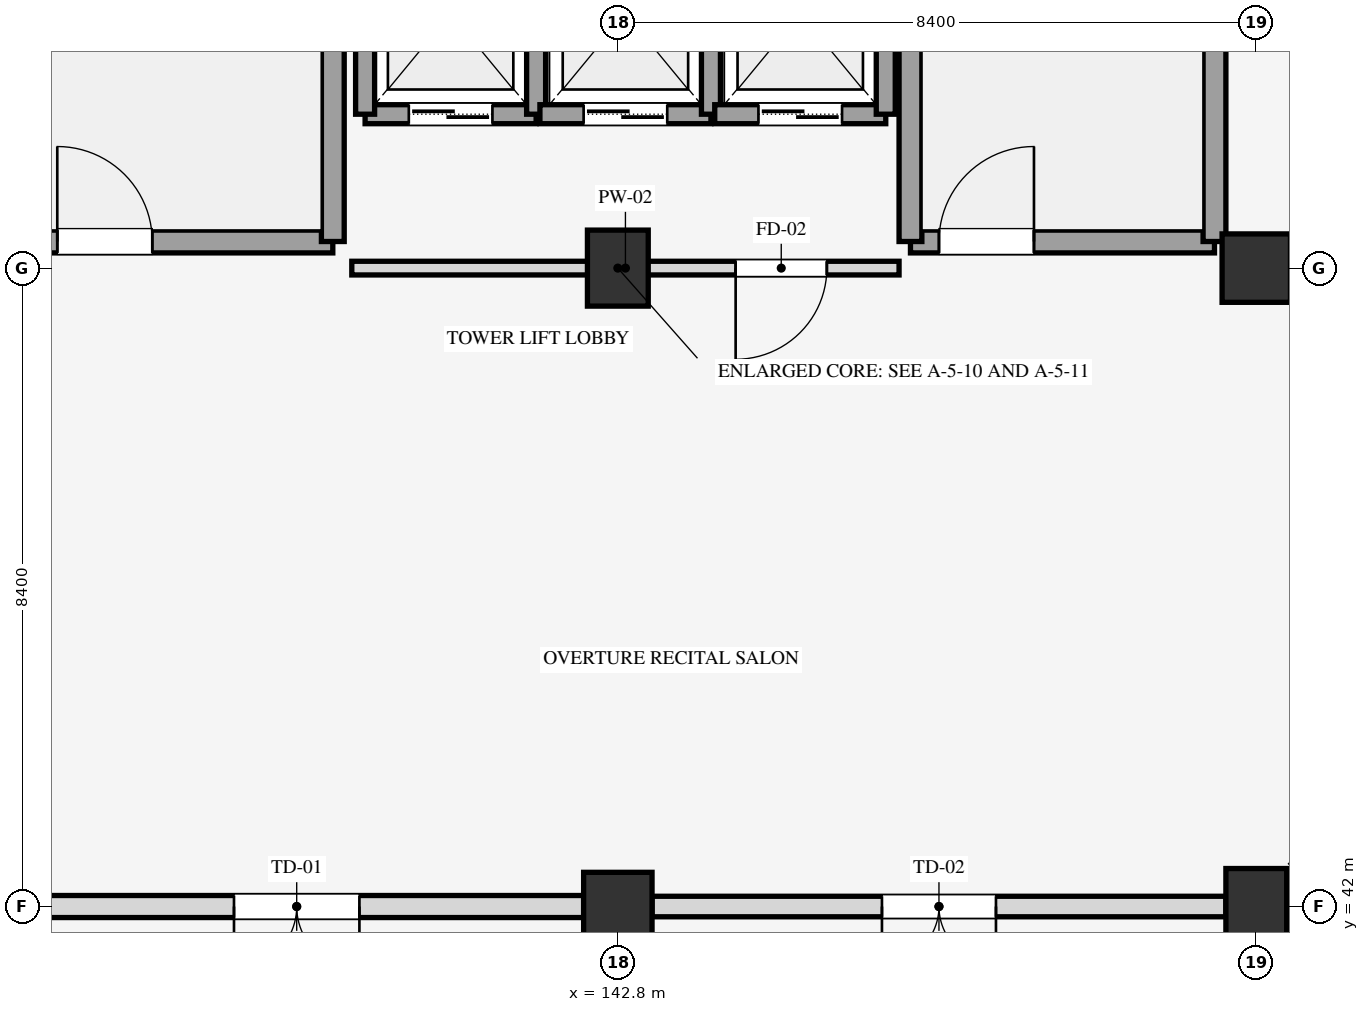
"""IFC4 building model, lengths in metres.
Left out: names, types, materials, properties, quantities, classifications, styles, units other than length and angle.
Written with IfcOpenShell. Run it as: python <this file> out.ifc"""

import sys

from ifc_helpers import new_model, si_unit, direction, frame, frame_2d, origin, origin_2d, place, context, subcontext, project, spatial, rectangle, extrude, element, fill, save


model = new_model("IFC4")
c1 = context("Model", 3, precision=1e-05, world=origin(), true_north=direction((0.0, 1.0)))
c2 = subcontext(c1, "Body", "Model", "MODEL_VIEW")
j1 = project(units=[si_unit("LENGTHUNIT", "METRE"), si_unit("PLANEANGLEUNIT", "RADIAN")], contexts=[c1])
p1 = place(None, origin())
s1 = spatial("IfcSite", under=j1, at=p1, CompositionType="ELEMENT")
p2 = place(p1, origin())
s2 = spatial("IfcBuilding", under=s1, at=p2, CompositionType="ELEMENT")
p3 = place(p2, frame((0.0, 0.0, 57.3)))
s3 = spatial("IfcBuildingStorey", under=s2, at=p3, CompositionType="ELEMENT", Elevation=57.3)
p4 = place(p3, frame((142.8, 42.0, 0.0), z_axis=(0.0, 0.0, 1.0), x_axis=(1.0, 0.0, 0.0)))
e1 = element("IfcColumn", 1, at=p4, inside=s3, PredefinedType="COLUMN", context=c2, shape_type="SweptSolid", body=[
    extrude(rectangle(XDim=0.9, YDim=0.9, at=origin_2d()), origin(), (0.0, 0.0, 1.0), 4.2),
])
for number, where, z_axis, x_axis in (
    (2, (142.8, 50.4, 0.0), (0.0, 0.0, 1.0), (1.0, 0.0, 0.0)),
    (3, (151.2, 42.0, 0.0), (0.0, 0.0, 1.0), (1.0, 0.0, 0.0)),
):
    element("IfcColumn", number, at=place(p3, frame(where, z_axis=z_axis, x_axis=x_axis)), inside=s3, PredefinedType="COLUMN", context=c2, shape_type="SweptSolid", body=[
        extrude(rectangle(XDim=0.8, YDim=1.0, at=origin_2d()), origin(), (0.0, 0.0, 1.0), 4.2),
    ])
p5 = place(p3, frame((151.2, 50.4, 0.0), z_axis=(0.0, 0.0, 1.0), x_axis=(1.0, 0.0, 0.0)))
e4 = element("IfcColumn", 4, at=p5, inside=s3, PredefinedType="COLUMN", context=c2, shape_type="SweptSolid", body=[
    extrude(rectangle(XDim=0.9, YDim=0.9, at=origin_2d()), origin(), (0.0, 0.0, 1.0), 4.2),
])
p6 = place(p3, frame((134.8, 42.0, 0.0), z_axis=(0.0, 0.0, 1.0), x_axis=(1.0, 0.0, 0.0)))
e5 = element("IfcWall", 5, at=p6, inside=s3, PredefinedType="STANDARD", context=c2, shape_type="SweptSolid", body=[
    extrude(rectangle(XDim=7.55, YDim=0.29, at=frame_2d((3.775, 0.0))), origin(), (0.0, 0.0, 1.0), 3.38),
])
p7 = place(p6, frame((2.95, 0.0, 0.0)))
e6 = element("IfcOpeningElement", 6, at=p7, cuts=e5, PredefinedType="OPENING", context=c2, shape_type="SweptSolid", body=[
    extrude(rectangle(XDim=1.65, YDim=2.2, at=frame_2d((0.825, 1.1))), frame((0.0, 0.155, 0.0), z_axis=(0.0, -1.0, 0.0), x_axis=(1.0, 0.0, 0.0)), (0.0, 0.0, 1.0), 0.31),
])
p8 = place(p3, frame((143.25, 42.0, 0.0), z_axis=(0.0, 0.0, 1.0), x_axis=(1.0, 0.0, 0.0)))
e7 = element("IfcWall", 7, at=p8, inside=s3, PredefinedType="STANDARD", context=c2, shape_type="SweptSolid", body=[
    extrude(rectangle(XDim=7.55, YDim=0.27, at=frame_2d((3.775, 0.0))), origin(), (0.0, 0.0, 1.0), 3.38),
])
p9 = place(p8, frame((3.025, 0.0, 0.0)))
e8 = element("IfcOpeningElement", 8, at=p9, cuts=e7, PredefinedType="OPENING", context=c2, shape_type="SweptSolid", body=[
    extrude(rectangle(XDim=1.5, YDim=2.2, at=frame_2d((0.75, 1.1))), frame((0.0, 0.145, 0.0), z_axis=(0.0, -1.0, 0.0), x_axis=(1.0, 0.0, 0.0)), (0.0, 0.0, 1.0), 0.29),
])
p10 = place(p3, frame((135.05, 50.75, 0.0), z_axis=(0.0, 0.0, 1.0), x_axis=(1.0, 0.0, 0.0)))
e9 = element("IfcWall", 9, at=p10, inside=s3, PredefinedType="SHEAR", context=c2, shape_type="SweptSolid", body=[
    extrude(rectangle(XDim=4.0, YDim=0.3, at=frame_2d((2.0, 0.0))), origin(), (0.0, 0.0, 1.0), 4.2),
])
p11 = place(p10, frame((0.375, 0.0, 0.0)))
e10 = element("IfcOpeningElement", 10, at=p11, cuts=e9, PredefinedType="OPENING", context=c2, shape_type="SweptSolid", body=[
    extrude(rectangle(XDim=1.25, YDim=2.15, at=frame_2d((0.625, 1.075))), frame((0.0, 0.16, 0.0), z_axis=(0.0, -1.0, 0.0), x_axis=(1.0, 0.0, 0.0)), (0.0, 0.0, 1.0), 0.32),
])
p12 = place(p3, frame((139.05, 50.75, 0.0), z_axis=(0.0, 0.0, 1.0), x_axis=(0.0, 1.0, 0.0)))
e11 = element("IfcWall", 11, at=p12, inside=s3, PredefinedType="SHEAR", context=c2, shape_type="SweptSolid", body=[
    extrude(rectangle(XDim=14.3, YDim=0.3, at=frame_2d((7.15, 0.0))), origin(), (0.0, 0.0, 1.0), 4.2),
])
p13 = place(p3, frame((137.25, 52.4, 0.0), z_axis=(0.0, 0.0, 1.0), x_axis=(0.0, 1.0, 0.0)))
e12 = element("IfcWall", 12, at=p13, inside=s3, PredefinedType="SHEAR", context=c2, shape_type="SweptSolid", body=[
    extrude(rectangle(XDim=11.0, YDim=0.2, at=frame_2d((5.5, 0.0))), origin(), (0.0, 0.0, 1.0), 4.2),
])
p14 = place(p3, frame((146.65, 50.75, 0.0), z_axis=(0.0, 0.0, 1.0), x_axis=(1.0, 0.0, 0.0)))
e13 = element("IfcWall", 13, at=p14, inside=s3, PredefinedType="SHEAR", context=c2, shape_type="SweptSolid", body=[
    extrude(rectangle(XDim=4.0, YDim=0.3, at=frame_2d((2.0, 0.0))), origin(), (0.0, 0.0, 1.0), 4.2),
])
p15 = place(p14, frame((0.375, 0.0, 0.0)))
e14 = element("IfcOpeningElement", 14, at=p15, cuts=e13, PredefinedType="OPENING", context=c2, shape_type="SweptSolid", body=[
    extrude(rectangle(XDim=1.25, YDim=2.15, at=frame_2d((0.625, 1.075))), frame((0.0, 0.16, 0.0), z_axis=(0.0, -1.0, 0.0), x_axis=(1.0, 0.0, 0.0)), (0.0, 0.0, 1.0), 0.32),
])
for number, where, z_axis, x_axis in (
    (15, (146.65, 50.75, 0.0), (0.0, 0.0, 1.0), (0.0, 1.0, 0.0)),
    (16, (150.65, 50.75, 0.0), (0.0, 0.0, 1.0), (0.0, 1.0, 0.0)),
):
    element("IfcWall", number, at=place(p3, frame(where, z_axis=z_axis, x_axis=x_axis)), inside=s3, PredefinedType="SHEAR", context=c2, shape_type="SweptSolid", body=[
        extrude(rectangle(XDim=14.3, YDim=0.3, at=frame_2d((7.15, 0.0))), origin(), (0.0, 0.0, 1.0), 4.2),
    ])
p16 = place(p3, frame((148.85, 52.4, 0.0), z_axis=(0.0, 0.0, 1.0), x_axis=(0.0, 1.0, 0.0)))
e17 = element("IfcWall", 17, at=p16, inside=s3, PredefinedType="SHEAR", context=c2, shape_type="SweptSolid", body=[
    extrude(rectangle(XDim=11.0, YDim=0.2, at=frame_2d((5.5, 0.0))), origin(), (0.0, 0.0, 1.0), 4.2),
])
p17 = place(p3, frame((139.475, 52.425, 0.0), z_axis=(0.0, 0.0, 1.0), x_axis=(1.0, 0.0, 0.0)))
e18 = element("IfcWall", 18, at=p17, inside=s3, PredefinedType="SHEAR", context=c2, shape_type="SweptSolid", body=[
    extrude(rectangle(XDim=2.25, YDim=0.25, at=frame_2d((1.125, 0.0))), origin(), (0.0, 0.0, 1.0), 3.96),
])
p18 = place(p17, frame((0.575, 0.0, 0.0)))
e19 = element("IfcOpeningElement", 19, at=p18, cuts=e18, PredefinedType="OPENING", context=c2, shape_type="SweptSolid", body=[
    extrude(rectangle(XDim=1.1, YDim=2.15, at=frame_2d((0.55, 1.075))), frame((0.0, 0.135, 0.0), z_axis=(0.0, -1.0, 0.0), x_axis=(1.0, 0.0, 0.0)), (0.0, 0.0, 1.0), 0.27),
])
for number, where, z_axis, x_axis in (
    (20, (139.475, 52.425, 0.0), (0.0, 0.0, 1.0), (0.0, 1.0, 0.0)),
    (21, (141.725, 52.425, 0.0), (0.0, 0.0, 1.0), (0.0, 1.0, 0.0)),
):
    element("IfcWall", number, at=place(p3, frame(where, z_axis=z_axis, x_axis=x_axis)), inside=s3, PredefinedType="SHEAR", context=c2, shape_type="SweptSolid", body=[
        extrude(rectangle(XDim=2.65, YDim=0.25, at=frame_2d((1.325, 0.0))), origin(), (0.0, 0.0, 1.0), 3.96),
    ])
p19 = place(p3, frame((141.775, 52.425, 0.0), z_axis=(0.0, 0.0, 1.0), x_axis=(1.0, 0.0, 0.0)))
e22 = element("IfcWall", 22, at=p19, inside=s3, PredefinedType="SHEAR", context=c2, shape_type="SweptSolid", body=[
    extrude(rectangle(XDim=2.25, YDim=0.25, at=frame_2d((1.125, 0.0))), origin(), (0.0, 0.0, 1.0), 3.96),
])
p20 = place(p19, frame((0.575, 0.0, 0.0)))
e23 = element("IfcOpeningElement", 23, at=p20, cuts=e22, PredefinedType="OPENING", context=c2, shape_type="SweptSolid", body=[
    extrude(rectangle(XDim=1.1, YDim=2.15, at=frame_2d((0.55, 1.075))), frame((0.0, 0.135, 0.0), z_axis=(0.0, -1.0, 0.0), x_axis=(1.0, 0.0, 0.0)), (0.0, 0.0, 1.0), 0.27),
])
p21 = place(p3, frame((144.025, 52.425, 0.0), z_axis=(0.0, 0.0, 1.0), x_axis=(0.0, 1.0, 0.0)))
e24 = element("IfcWall", 24, at=p21, inside=s3, PredefinedType="SHEAR", context=c2, shape_type="SweptSolid", body=[
    extrude(rectangle(XDim=2.65, YDim=0.25, at=frame_2d((1.325, 0.0))), origin(), (0.0, 0.0, 1.0), 3.96),
])
p22 = place(p3, frame((144.075, 52.425, 0.0), z_axis=(0.0, 0.0, 1.0), x_axis=(1.0, 0.0, 0.0)))
e25 = element("IfcWall", 25, at=p22, inside=s3, PredefinedType="SHEAR", context=c2, shape_type="SweptSolid", body=[
    extrude(rectangle(XDim=2.25, YDim=0.25, at=frame_2d((1.125, 0.0))), origin(), (0.0, 0.0, 1.0), 3.96),
])
p23 = place(p22, frame((0.575, 0.0, 0.0)))
e26 = element("IfcOpeningElement", 26, at=p23, cuts=e25, PredefinedType="OPENING", context=c2, shape_type="SweptSolid", body=[
    extrude(rectangle(XDim=1.1, YDim=2.15, at=frame_2d((0.55, 1.075))), frame((0.0, 0.135, 0.0), z_axis=(0.0, -1.0, 0.0), x_axis=(1.0, 0.0, 0.0)), (0.0, 0.0, 1.0), 0.27),
])
p24 = place(p3, frame((146.325, 52.425, 0.0), z_axis=(0.0, 0.0, 1.0), x_axis=(0.0, 1.0, 0.0)))
e27 = element("IfcWall", 27, at=p24, inside=s3, PredefinedType="SHEAR", context=c2, shape_type="SweptSolid", body=[
    extrude(rectangle(XDim=2.65, YDim=0.25, at=frame_2d((1.325, 0.0))), origin(), (0.0, 0.0, 1.0), 3.96),
])
p25 = place(p3, frame((139.3, 50.4, 0.0), z_axis=(0.0, 0.0, 1.0), x_axis=(1.0, 0.0, 0.0)))
e28 = element("IfcWall", 28, at=p25, inside=s3, PredefinedType="PARTITIONING", context=c2, shape_type="SweptSolid", body=[
    extrude(rectangle(XDim=7.2, YDim=0.18, at=frame_2d((3.6, 0.0))), origin(), (0.0, 0.0, 1.0), 3.24),
])
p26 = place(p25, frame((5.05, 0.0, 0.0)))
e29 = element("IfcOpeningElement", 29, at=p26, cuts=e28, PredefinedType="OPENING", context=c2, shape_type="SweptSolid", body=[
    extrude(rectangle(XDim=1.2, YDim=2.15, at=frame_2d((0.6, 1.075))), frame((0.0, 0.1, 0.0), z_axis=(0.0, -1.0, 0.0), x_axis=(1.0, 0.0, 0.0)), (0.0, 0.0, 1.0), 0.2),
])
p27 = place(p7, frame((1.65, 0.0, 0.0), z_axis=(0.0, 0.0, 1.0), x_axis=(-1.0, 0.0, 0.0)))
e30 = element("IfcDoor", 30, at=p27, inside=s3, OperationType="DOUBLE_DOOR_SINGLE_SWING", PredefinedType="DOOR", context=c2, shape_type="SweptSolid", body=[
    extrude(rectangle(XDim=1.65, YDim=2.2, at=frame_2d((0.825, 1.1))), frame((0.0, 0.025, 0.0), z_axis=(0.0, -1.0, 0.0), x_axis=(1.0, 0.0, 0.0)), (0.0, 0.0, 1.0), 0.05),
])
fill(e6, e30)
p28 = place(p9, frame((1.5, 0.0, 0.0), z_axis=(0.0, 0.0, 1.0), x_axis=(-1.0, 0.0, 0.0)))
e31 = element("IfcDoor", 31, at=p28, inside=s3, OperationType="DOUBLE_DOOR_SINGLE_SWING", PredefinedType="DOOR", context=c2, shape_type="SweptSolid", body=[
    extrude(rectangle(XDim=1.5, YDim=2.2, at=frame_2d((0.75, 1.1))), frame((0.0, 0.025, 0.0), z_axis=(0.0, -1.0, 0.0), x_axis=(1.0, 0.0, 0.0)), (0.0, 0.0, 1.0), 0.05),
])
fill(e8, e31)
p29 = place(p11, origin())
e32 = element("IfcDoor", 32, at=p29, inside=s3, OperationType="SINGLE_SWING_LEFT", PredefinedType="DOOR", context=c2, shape_type="SweptSolid", body=[
    extrude(rectangle(XDim=1.25, YDim=2.15, at=frame_2d((0.625, 1.075))), frame((0.0, 0.025, 0.0), z_axis=(0.0, -1.0, 0.0), x_axis=(1.0, 0.0, 0.0)), (0.0, 0.0, 1.0), 0.05),
])
fill(e10, e32)
p30 = place(p15, origin())
e33 = element("IfcDoor", 33, at=p30, inside=s3, OperationType="SINGLE_SWING_RIGHT", PredefinedType="DOOR", context=c2, shape_type="SweptSolid", body=[
    extrude(rectangle(XDim=1.25, YDim=2.15, at=frame_2d((0.625, 1.075))), frame((0.0, 0.025, 0.0), z_axis=(0.0, -1.0, 0.0), x_axis=(1.0, 0.0, 0.0)), (0.0, 0.0, 1.0), 0.05),
])
fill(e14, e33)
p31 = place(p18, origin())
e34 = element("IfcDoor", 34, at=p31, inside=s3, OperationType="DOUBLE_DOOR_SLIDING", PredefinedType="DOOR", context=c2, shape_type="SweptSolid", body=[
    extrude(rectangle(XDim=1.1, YDim=2.15, at=frame_2d((0.55, 1.075))), frame((0.0, 0.025, 0.0), z_axis=(0.0, -1.0, 0.0), x_axis=(1.0, 0.0, 0.0)), (0.0, 0.0, 1.0), 0.05),
])
fill(e19, e34)
p32 = place(p20, origin())
e35 = element("IfcDoor", 35, at=p32, inside=s3, OperationType="DOUBLE_DOOR_SLIDING", PredefinedType="DOOR", context=c2, shape_type="SweptSolid", body=[
    extrude(rectangle(XDim=1.1, YDim=2.15, at=frame_2d((0.55, 1.075))), frame((0.0, 0.025, 0.0), z_axis=(0.0, -1.0, 0.0), x_axis=(1.0, 0.0, 0.0)), (0.0, 0.0, 1.0), 0.05),
])
fill(e23, e35)
p33 = place(p23, origin())
e36 = element("IfcDoor", 36, at=p33, inside=s3, OperationType="DOUBLE_DOOR_SLIDING", PredefinedType="DOOR", context=c2, shape_type="SweptSolid", body=[
    extrude(rectangle(XDim=1.1, YDim=2.15, at=frame_2d((0.55, 1.075))), frame((0.0, 0.025, 0.0), z_axis=(0.0, -1.0, 0.0), x_axis=(1.0, 0.0, 0.0)), (0.0, 0.0, 1.0), 0.05),
])
fill(e26, e36)
p34 = place(p26, frame((1.2, 0.0, 0.0), z_axis=(0.0, 0.0, 1.0), x_axis=(-1.0, 0.0, 0.0)))
e37 = element("IfcDoor", 37, at=p34, inside=s3, OperationType="SINGLE_SWING_RIGHT", PredefinedType="DOOR", context=c2, shape_type="SweptSolid", body=[
    extrude(rectangle(XDim=1.2, YDim=2.15, at=frame_2d((0.6, 1.075))), frame((0.0, 0.025, 0.0), z_axis=(0.0, -1.0, 0.0), x_axis=(1.0, 0.0, 0.0)), (0.0, 0.0, 1.0), 0.05),
])
fill(e29, e37)
save(model, sys.argv[1])
